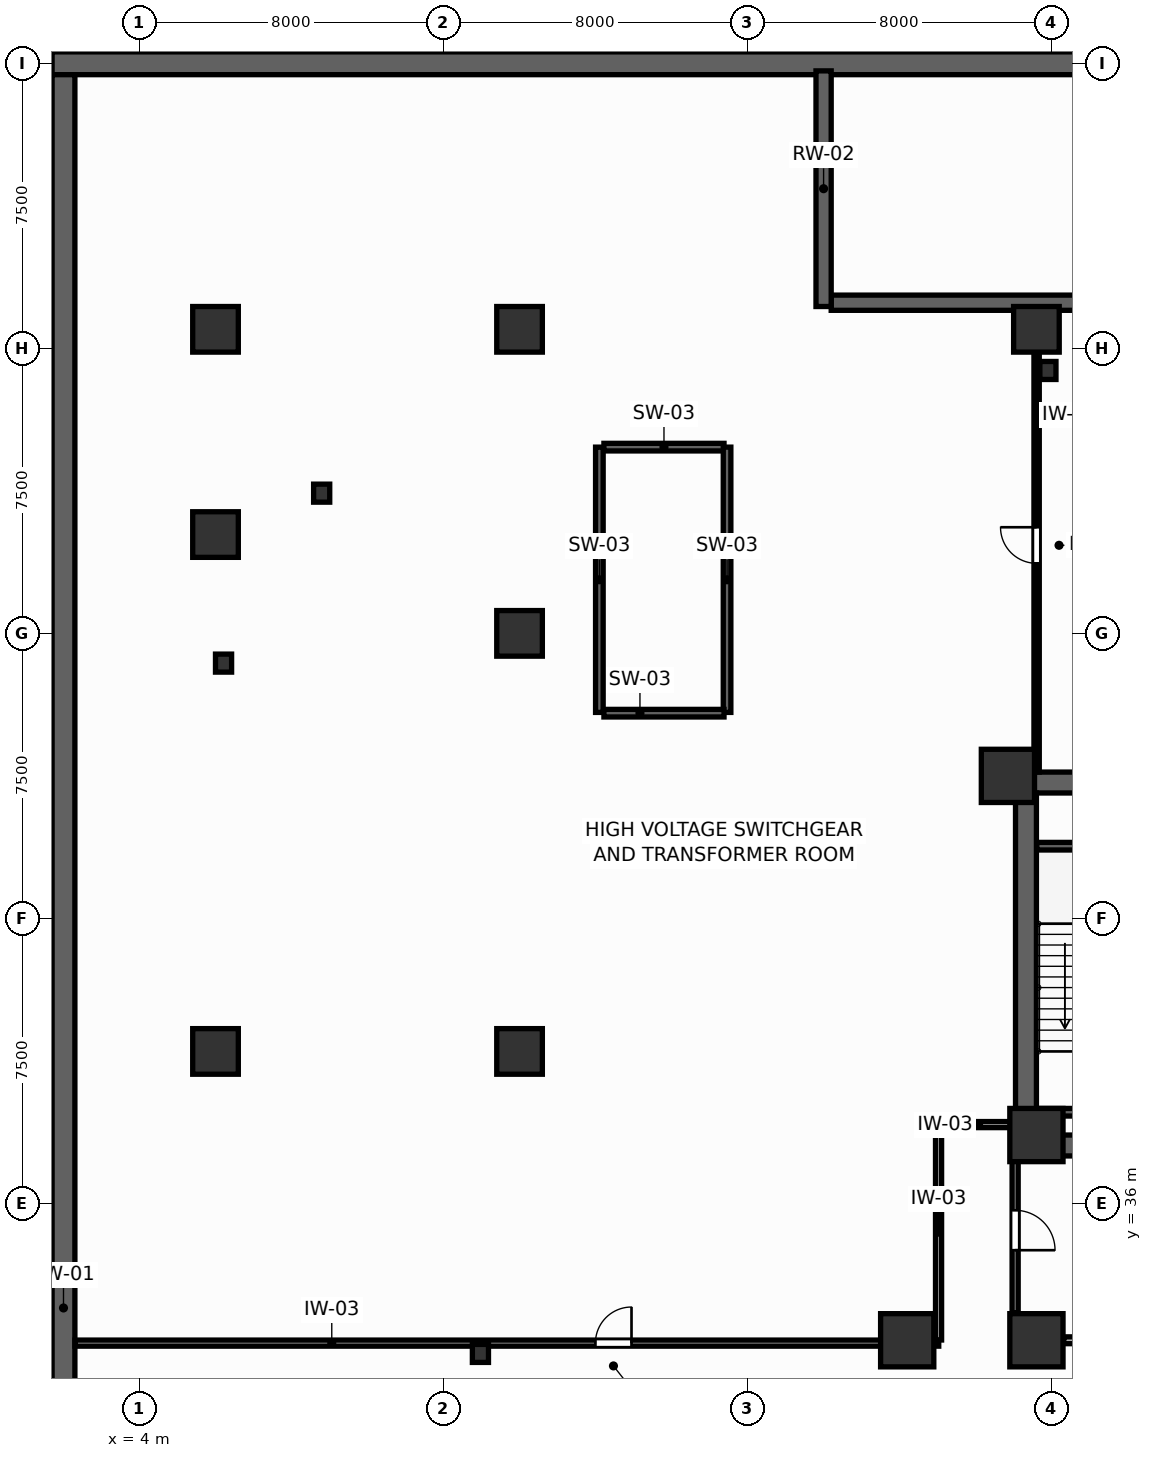
"""IFC4 building model, lengths in metres.
Left out: names, types, materials, properties, quantities, classifications, styles, units other than length and angle.
Written with IfcOpenShell. Run it as: python <this file> out.ifc"""

import sys

from ifc_helpers import new_model, si_unit, direction, frame, frame_2d, origin, origin_2d, place, context, subcontext, project, spatial, rectangle, i_section, extrude, source, transform, mapped, element, fill, save


model = new_model("IFC4")
c1 = context("Model", 3, precision=1e-05, world=origin(), true_north=direction((0.0, 1.0)))
c2 = subcontext(c1, "Body", "Model", "MODEL_VIEW")
j1 = project(units=[si_unit("LENGTHUNIT", "METRE"), si_unit("PLANEANGLEUNIT", "RADIAN")], contexts=[c1])
p1 = place(None, origin())
s1 = spatial("IfcSite", under=j1, at=p1, CompositionType="ELEMENT")
p2 = place(p1, origin())
s2 = spatial("IfcBuilding", under=s1, at=p2, CompositionType="ELEMENT")
p3 = place(p2, frame((0.0, 0.0, -9.0)))
s3 = spatial("IfcBuildingStorey", under=s2, at=p3, CompositionType="ELEMENT", Elevation=-9.0)
p4 = place(p3, frame((27.05, 47.075, 0.0), z_axis=(0.0, 0.0, 1.0), x_axis=(1.0, 0.0, 0.0)))
e1 = element("IfcWall", 1, at=p4, inside=s3, PredefinedType="SHEAR", context=c2, shape_type="SweptSolid", body=[
    extrude(rectangle(XDim=17.9, YDim=0.55, at=frame_2d((8.95, 0.0))), origin(), (0.0, 0.0, 1.0), 4.5),
])
p5 = place(p3, frame((27.05, 37.525, 0.0), z_axis=(0.0, 0.0, 1.0), x_axis=(1.0, 0.0, 0.0)))
e2 = element("IfcWall", 2, at=p5, inside=s3, PredefinedType="SHEAR", context=c2, shape_type="SweptSolid", body=[
    extrude(rectangle(XDim=17.9, YDim=0.55, at=frame_2d((8.95, 0.0))), origin(), (0.0, 0.0, 1.0), 4.5),
])
p6 = place(p5, frame((4.975, 0.0, 0.0)))
e3 = element("IfcOpeningElement", 3, at=p6, cuts=e2, PredefinedType="OPENING", context=c2, shape_type="SweptSolid", body=[
    extrude(rectangle(XDim=1.05, YDim=2.1, at=frame_2d((0.525, 1.05))), frame((0.0, 0.285, 0.0), z_axis=(0.0, -1.0, 0.0), x_axis=(1.0, 0.0, 0.0)), (0.0, 0.0, 1.0), 0.57),
])
p7 = place(p5, frame((11.875, 0.0, 0.0)))
e4 = element("IfcOpeningElement", 4, at=p7, cuts=e2, PredefinedType="OPENING", context=c2, shape_type="SweptSolid", body=[
    extrude(rectangle(XDim=1.05, YDim=2.1, at=frame_2d((0.525, 1.05))), frame((0.0, 0.285, 0.0), z_axis=(0.0, -1.0, 0.0), x_axis=(1.0, 0.0, 0.0)), (0.0, 0.0, 1.0), 0.57),
])
p8 = place(p3, frame((27.325, 37.8, 0.0), z_axis=(0.0, 0.0, 1.0), x_axis=(0.0, 1.0, 0.0)))
e5 = element("IfcWall", 5, at=p8, inside=s3, PredefinedType="SHEAR", context=c2, shape_type="SweptSolid", body=[
    extrude(rectangle(XDim=9.0, YDim=0.55, at=frame_2d((4.5, 0.0))), origin(), (0.0, 0.0, 1.0), 4.5),
])
p9 = place(p3, frame((1.7, 66.0, 0.0), z_axis=(0.0, 0.0, 1.0), x_axis=(1.0, 0.0, 0.0)))
e6 = element("IfcWall", 6, at=p9, inside=s3, PredefinedType="SOLIDWALL", context=c2, shape_type="SweptSolid", body=[
    extrude(rectangle(XDim=87.98, YDim=0.6, at=frame_2d((43.99, 0.0))), origin(), (0.0, 0.0, 1.0), 4.5),
])
p10 = place(p3, frame((22.2, 59.7, 0.0), z_axis=(0.0, 0.0, 1.0), x_axis=(1.0, 0.0, 0.0)))
e7 = element("IfcWall", 7, at=p10, inside=s3, PredefinedType="SOLIDWALL", context=c2, shape_type="SweptSolid", body=[
    extrude(rectangle(XDim=35.6, YDim=0.4, at=frame_2d((17.8, 0.0))), origin(), (0.0, 0.0, 1.0), 4.18),
])
p11 = place(p3, frame((2.0, 0.8, 0.0), z_axis=(0.0, 0.0, 1.0), x_axis=(0.0, 1.0, 0.0)))
e8 = element("IfcWall", 8, at=p11, inside=s3, PredefinedType="SOLIDWALL", context=c2, shape_type="SweptSolid", body=[
    extrude(rectangle(XDim=64.9, YDim=0.6, at=frame_2d((32.45, 0.0))), origin(), (0.0, 0.0, 1.0), 4.5),
])
p12 = place(p3, frame((22.0, 59.6, 0.0), z_axis=(0.0, 0.0, 1.0), x_axis=(0.0, 1.0, 0.0)))
e9 = element("IfcWall", 9, at=p12, inside=s3, PredefinedType="SOLIDWALL", context=c2, shape_type="SweptSolid", body=[
    extrude(rectangle(XDim=6.2, YDim=0.4, at=frame_2d((3.1, 0.0))), origin(), (0.0, 0.0, 1.0), 4.18),
])
p13 = place(p3, frame((16.1, 48.92, 0.0), z_axis=(0.0, 0.0, 1.0), x_axis=(0.0, 1.0, 0.0)))
e10 = element("IfcWall", 10, at=p13, inside=s3, PredefinedType="SHEAR", context=c2, shape_type="SweptSolid", body=[
    extrude(rectangle(XDim=6.98, YDim=0.2, at=frame_2d((3.49, 0.0))), origin(), (0.0, 0.0, 1.0), 4.5),
])
p14 = place(p3, frame((16.22, 55.9, 0.0), z_axis=(0.0, 0.0, 1.0), x_axis=(1.0, 0.0, 0.0)))
e11 = element("IfcWall", 11, at=p14, inside=s3, PredefinedType="SHEAR", context=c2, shape_type="SweptSolid", body=[
    extrude(rectangle(XDim=3.16, YDim=0.2, at=frame_2d((1.58, 0.0))), origin(), (0.0, 0.0, 1.0), 4.5),
])
p15 = place(p3, frame((19.46, 48.92, 0.0), z_axis=(0.0, 0.0, 1.0), x_axis=(0.0, 1.0, 0.0)))
e12 = element("IfcWall", 12, at=p15, inside=s3, PredefinedType="SHEAR", context=c2, shape_type="SweptSolid", body=[
    extrude(rectangle(XDim=6.98, YDim=0.2, at=frame_2d((3.49, 0.0))), origin(), (0.0, 0.0, 1.0), 4.5),
])
p16 = place(p3, frame((16.22, 48.9, 0.0), z_axis=(0.0, 0.0, 1.0), x_axis=(1.0, 0.0, 0.0)))
e13 = element("IfcWall", 13, at=p16, inside=s3, PredefinedType="SHEAR", context=c2, shape_type="SweptSolid", body=[
    extrude(rectangle(XDim=3.16, YDim=0.2, at=frame_2d((1.58, 0.0))), origin(), (0.0, 0.0, 1.0), 4.5),
])
m1 = source(origin(), c2, "Body", "SweptSolid", [
    extrude(rectangle(XDim=1.4, YDim=1.4, at=origin_2d()), origin(), (0.0, 0.0, 1.0), 4.5),
])
for number, where, z_axis, x_axis in (
    (14, (26.85, 47.25, 0.0), (0.0, 0.0, 1.0), (1.0, 0.0, 0.0)),
    (15, (27.6, 37.8, 0.0), (0.0, 0.0, 1.0), (1.0, 0.0, 0.0)),
    (16, (27.6, 32.4, 0.0), (0.0, 0.0, 1.0), (1.0, 0.0, 0.0)),
    (17, (24.2, 32.4, 0.0), (0.0, 0.0, 1.0), (1.0, 0.0, 0.0)),
):
    element("IfcColumn", number, at=place(p3, frame(where, z_axis=z_axis, x_axis=x_axis)), inside=s3, PredefinedType="COLUMN", context=c2, shape_type="MappedRepresentation", body=[
        mapped(m1, transform((0.0, 0.0, 0.0), scale=1.0)),
    ])
m2 = source(origin(), c2, "Body", "SweptSolid", [
    extrude(rectangle(XDim=1.2, YDim=1.2, at=origin_2d()), origin(), (0.0, 0.0, 1.0), 4.5),
])
for number, where, z_axis, x_axis in (
    (18, (6.0, 40.0, 0.0), (0.0, 0.0, 1.0), (1.0, 0.0, 0.0)),
    (19, (6.0, 53.6, 0.0), (0.0, 0.0, 1.0), (1.0, 0.0, 0.0)),
    (20, (6.0, 59.0, 0.0), (0.0, 0.0, 1.0), (1.0, 0.0, 0.0)),
    (21, (14.0, 59.0, 0.0), (0.0, 0.0, 1.0), (1.0, 0.0, 0.0)),
    (22, (27.6, 59.0, 0.0), (0.0, 0.0, 1.0), (1.0, 0.0, 0.0)),
    (23, (14.0, 40.0, 0.0), (0.0, 0.0, 1.0), (1.0, 0.0, 0.0)),
    (24, (14.0, 51.0, 0.0), (0.0, 0.0, 1.0), (1.0, 0.0, 0.0)),
):
    element("IfcColumn", number, at=place(p3, frame(where, z_axis=z_axis, x_axis=x_axis)), inside=s3, PredefinedType="COLUMN", context=c2, shape_type="MappedRepresentation", body=[
        mapped(m2, transform((0.0, 0.0, 0.0), scale=1.0)),
    ])
m3 = source(origin(), c2, "Body", "SweptSolid", [
    extrude(i_section(OverallWidth=0.424, OverallDepth=0.474, WebThickness=0.045, FlangeThickness=0.072, FilletRadius=0.015, at=origin_2d()), origin(), (0.0, 0.0, 1.0), 4.5),
])
for number, where, z_axis, x_axis in (
    (25, (27.903, 57.917, 0.0), (0.0, 0.0, 1.0), (1.0, 0.0, 0.0)),
    (26, (8.793, 54.689, 0.0), (0.0, 0.0, 1.0), (1.0, 0.0, 0.0)),
    (27, (6.211, 50.217, 0.0), (0.0, 0.0, 1.0), (1.0, 0.0, 0.0)),
    (28, (12.97, 32.054, 0.0), (0.0, 0.0, 1.0), (1.0, 0.0, 0.0)),
):
    element("IfcColumn", number, at=place(p3, frame(where, z_axis=z_axis, x_axis=x_axis)), inside=s3, PredefinedType="COLUMN", context=c2, shape_type="MappedRepresentation", body=[
        mapped(m3, transform((0.0, 0.0, 0.0), scale=1.0)),
    ])
for number, where, z_axis, x_axis in (
    (29, (27.61, 45.4, 0.0), (0.0, 0.0, 1.0), (1.0, 0.0, 0.0)),
    (30, (27.61, 38.4, 0.0), (0.0, 0.0, 1.0), (1.0, 0.0, 0.0)),
):
    element("IfcWall", number, at=place(p3, frame(where, z_axis=z_axis, x_axis=x_axis)), inside=s3, PredefinedType="SHEAR", context=c2, shape_type="SweptSolid", body=[
        extrude(rectangle(XDim=3.14, YDim=0.2, at=frame_2d((1.57, 0.0))), origin(), (0.0, 0.0, 1.0), 4.5),
    ])
p17 = place(p3, frame((28.32, 32.4, 0.0), z_axis=(0.0, 0.0, 1.0), x_axis=(1.0, 0.0, 0.0)))
e31 = element("IfcWall", 31, at=p17, inside=s3, PredefinedType="PARTITIONING", context=c2, shape_type="SweptSolid", body=[
    extrude(rectangle(XDim=6.96, YDim=0.18, at=frame_2d((3.48, 0.0))), origin(), (0.0, 0.0, 1.0), 3.48),
])
p18 = place(p17, frame((2.4, 0.0, 0.0)))
e32 = element("IfcOpeningElement", 32, at=p18, cuts=e31, PredefinedType="OPENING", context=c2, shape_type="SweptSolid", body=[
    extrude(rectangle(XDim=1.05, YDim=2.1, at=frame_2d((0.525, 1.05))), frame((0.0, 0.1, 0.0), z_axis=(0.0, -1.0, 0.0), x_axis=(1.0, 0.0, 0.0)), (0.0, 0.0, 1.0), 0.2),
])
p19 = place(p3, frame((27.04, 33.12, 0.0), z_axis=(0.0, 0.0, 1.0), x_axis=(0.0, 1.0, 0.0)))
e33 = element("IfcWall", 33, at=p19, inside=s3, PredefinedType="PARTITIONING", context=c2, shape_type="SweptSolid", body=[
    extrude(rectangle(XDim=4.38, YDim=0.16, at=frame_2d((2.19, 0.0))), origin(), (0.0, 0.0, 1.0), 4.18),
])
p20 = place(p19, frame((1.65, 0.0, 0.0)))
e34 = element("IfcOpeningElement", 34, at=p20, cuts=e33, PredefinedType="OPENING", context=c2, shape_type="SweptSolid", body=[
    extrude(rectangle(XDim=1.05, YDim=2.1, at=frame_2d((0.525, 1.05))), frame((0.0, 0.09, 0.0), z_axis=(0.0, -1.0, 0.0), x_axis=(1.0, 0.0, 0.0)), (0.0, 0.0, 1.0), 0.18),
])
p21 = place(p3, frame((2.302, 32.325, 0.0), z_axis=(0.0, 0.0, 1.0), x_axis=(1.0, 0.0, 0.0)))
e35 = element("IfcWall", 35, at=p21, inside=s3, PredefinedType="PARTITIONING", context=c2, shape_type="SweptSolid", body=[
    extrude(rectangle(XDim=22.728, YDim=0.16, at=frame_2d((11.364, 0.0))), origin(), (0.0, 0.0, 1.0), 3.48),
])
p22 = place(p21, frame((13.694, 0.0, 0.0)))
e36 = element("IfcOpeningElement", 36, at=p22, cuts=e35, PredefinedType="OPENING", context=c2, shape_type="SweptSolid", body=[
    extrude(rectangle(XDim=0.95, YDim=2.05, at=frame_2d((0.475, 1.025))), frame((0.0, 0.09, 0.0), z_axis=(0.0, -1.0, 0.0), x_axis=(1.0, 0.0, 0.0)), (0.0, 0.0, 1.0), 0.18),
])
p23 = place(p3, frame((25.025, 32.407, 0.0), z_axis=(0.0, 0.0, 1.0), x_axis=(0.0, 1.0, 0.0)))
e37 = element("IfcWall", 37, at=p23, inside=s3, PredefinedType="PARTITIONING", context=c2, shape_type="SweptSolid", body=[
    extrude(rectangle(XDim=5.673, YDim=0.16, at=frame_2d((2.836, 0.0))), origin(), (0.0, 0.0, 1.0), 4.18),
])
p24 = place(p3, frame((25.107, 38.075, 0.0), z_axis=(0.0, 0.0, 1.0), x_axis=(1.0, 0.0, 0.0)))
e38 = element("IfcWall", 38, at=p24, inside=s3, PredefinedType="PARTITIONING", context=c2, shape_type="SweptSolid", body=[
    extrude(rectangle(XDim=1.941, YDim=0.16, at=frame_2d((0.971, 0.0))), origin(), (0.0, 0.0, 1.0), 4.18),
])
p25 = place(p3, frame((27.605, 47.352, 0.0), z_axis=(0.0, 0.0, 1.0), x_axis=(0.0, 1.0, 0.0)))
e39 = element("IfcWall", 39, at=p25, inside=s3, PredefinedType="PARTITIONING", context=c2, shape_type="SweptSolid", body=[
    extrude(rectangle(XDim=12.146, YDim=0.14, at=frame_2d((6.073, 0.0))), origin(), (0.0, 0.0, 1.0), 4.18),
])
p26 = place(p25, frame((5.49, 0.0, 0.0)))
e40 = element("IfcOpeningElement", 40, at=p26, cuts=e39, PredefinedType="OPENING", context=c2, shape_type="SweptSolid", body=[
    extrude(rectangle(XDim=0.95, YDim=2.05, at=frame_2d((0.475, 1.025))), frame((0.0, 0.08, 0.0), z_axis=(0.0, -1.0, 0.0), x_axis=(1.0, 0.0, 0.0)), (0.0, 0.0, 1.0), 0.16),
])
p27 = place(p20, frame((1.05, 0.0, 0.0), z_axis=(0.0, 0.0, 1.0), x_axis=(-1.0, 0.0, 0.0)))
e41 = element("IfcDoor", 41, at=p27, inside=s3, OperationType="SINGLE_SWING_RIGHT", PredefinedType="DOOR", context=c2, shape_type="SweptSolid", body=[
    extrude(rectangle(XDim=1.05, YDim=2.1, at=frame_2d((0.525, 1.05))), frame((0.0, 0.025, 0.0), z_axis=(0.0, -1.0, 0.0), x_axis=(1.0, 0.0, 0.0)), (0.0, 0.0, 1.0), 0.05),
])
fill(e34, e41)
p28 = place(p22, origin())
e42 = element("IfcDoor", 42, at=p28, inside=s3, OperationType="SINGLE_SWING_RIGHT", PredefinedType="DOOR", context=c2, shape_type="SweptSolid", body=[
    extrude(rectangle(XDim=0.95, YDim=2.05, at=frame_2d((0.475, 1.025))), frame((0.0, 0.025, 0.0), z_axis=(0.0, -1.0, 0.0), x_axis=(1.0, 0.0, 0.0)), (0.0, 0.0, 1.0), 0.05),
])
fill(e36, e42)
p29 = place(p26, origin())
e43 = element("IfcDoor", 43, at=p29, inside=s3, OperationType="SINGLE_SWING_RIGHT", PredefinedType="DOOR", context=c2, shape_type="SweptSolid", body=[
    extrude(rectangle(XDim=0.95, YDim=2.05, at=frame_2d((0.475, 1.025))), frame((0.0, 0.025, 0.0), z_axis=(0.0, -1.0, 0.0), x_axis=(1.0, 0.0, 0.0)), (0.0, 0.0, 1.0), 0.05),
])
fill(e40, e43)
save(model, sys.argv[1])
